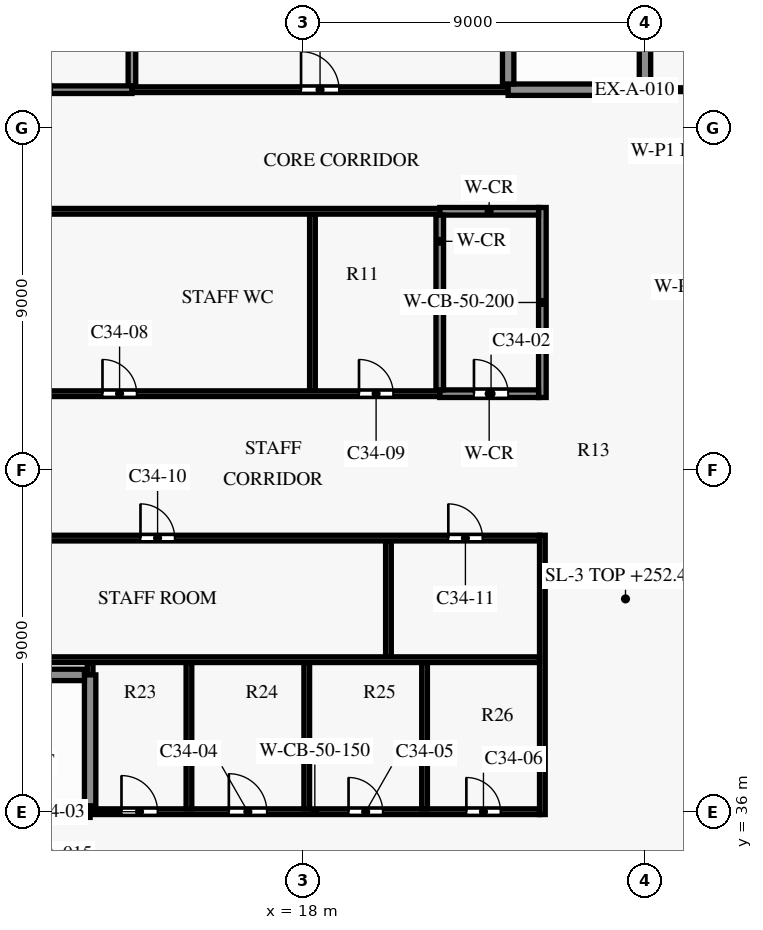
"""IFC4 building model, lengths in metres.
Left out: names, types, materials, properties, quantities, classifications, styles, units other than length and angle.
Written with IfcOpenShell. Run it as: python <this file> out.ifc"""

import sys

from ifc_helpers import new_model, si_unit, direction, frame, frame_2d, origin, place, context, subcontext, project, spatial, rectangle, extrude, element, fill, save


model = new_model("IFC4")
c1 = context("Model", 3, precision=1e-05, world=origin(), true_north=direction((0.0, 1.0)))
c2 = subcontext(c1, "Body", "Model", "MODEL_VIEW")
j1 = project(units=[si_unit("LENGTHUNIT", "METRE"), si_unit("PLANEANGLEUNIT", "RADIAN")], contexts=[c1])
p1 = place(None, origin())
s1 = spatial("IfcSite", under=j1, at=p1, CompositionType="ELEMENT")
p2 = place(p1, origin())
s2 = spatial("IfcBuilding", under=s1, at=p2, CompositionType="ELEMENT")
p3 = place(p2, frame((0.0, 0.0, 252.4)))
s3 = spatial("IfcBuildingStorey", under=s2, at=p3, CompositionType="ELEMENT", Elevation=252.4)
p4 = place(p3, frame((12.4, 36.0, 0.0), z_axis=(0.0, 0.0, 1.0), x_axis=(1.0, 0.0, 0.0)))
e1 = element("IfcWall", 1, at=p4, inside=s3, PredefinedType="SHEAR", context=c2, shape_type="SweptSolid", body=[
    extrude(rectangle(XDim=11.825, YDim=0.15, at=frame_2d((5.913, 0.0))), origin(), (0.0, 0.0, 1.0), 3.5),
])
p5 = place(p4, frame((0.825, 0.0, 0.0)))
e2 = element("IfcOpeningElement", 2, at=p5, cuts=e1, PredefinedType="OPENING", context=c2, shape_type="SweptSolid", body=[
    extrude(rectangle(XDim=0.95, YDim=2.1, at=frame_2d((0.475, 1.05))), frame((0.0, 0.085, 0.0), z_axis=(0.0, -1.0, 0.0), x_axis=(1.0, 0.0, 0.0)), (0.0, 0.0, 1.0), 0.17),
])
p6 = place(p4, frame((3.65, 0.0, 0.0)))
e3 = element("IfcOpeningElement", 3, at=p6, cuts=e1, PredefinedType="OPENING", context=c2, shape_type="SweptSolid", body=[
    extrude(rectangle(XDim=1.0, YDim=2.1, at=frame_2d((0.5, 1.05))), frame((0.0, 0.085, 0.0), z_axis=(0.0, -1.0, 0.0), x_axis=(1.0, 0.0, 0.0)), (0.0, 0.0, 1.0), 0.17),
])
p7 = place(p4, frame((6.8, 0.0, 0.0)))
e4 = element("IfcOpeningElement", 4, at=p7, cuts=e1, PredefinedType="OPENING", context=c2, shape_type="SweptSolid", body=[
    extrude(rectangle(XDim=0.9, YDim=2.1, at=frame_2d((0.45, 1.05))), frame((0.0, 0.085, 0.0), z_axis=(0.0, -1.0, 0.0), x_axis=(1.0, 0.0, 0.0)), (0.0, 0.0, 1.0), 0.17),
])
p8 = place(p4, frame((9.9, 0.0, 0.0)))
e5 = element("IfcOpeningElement", 5, at=p8, cuts=e1, PredefinedType="OPENING", context=c2, shape_type="SweptSolid", body=[
    extrude(rectangle(XDim=0.9, YDim=2.1, at=frame_2d((0.45, 1.05))), frame((0.0, 0.085, 0.0), z_axis=(0.0, -1.0, 0.0), x_axis=(1.0, 0.0, 0.0)), (0.0, 0.0, 1.0), 0.17),
])
p9 = place(p3, frame((4.4, 36.0, 0.0), z_axis=(0.0, 0.0, 1.0), x_axis=(1.0, 0.0, 0.0)))
e6 = element("IfcWall", 6, at=p9, inside=s3, PredefinedType="SHEAR", context=c2, shape_type="SweptSolid", body=[
    extrude(rectangle(XDim=8.0, YDim=0.3, at=frame_2d((4.0, 0.0))), origin(), (0.0, 0.0, 1.0), 3.5),
])
p10 = place(p9, frame((0.3, 0.0, 0.0)))
e7 = element("IfcOpeningElement", 7, at=p10, cuts=e6, PredefinedType="OPENING", context=c2, shape_type="SweptSolid", body=[
    extrude(rectangle(XDim=1.5, YDim=2.2, at=frame_2d((0.75, 1.1))), frame((0.0, 0.16, 0.0), z_axis=(0.0, -1.0, 0.0), x_axis=(1.0, 0.0, 0.0)), (0.0, 0.0, 1.0), 0.32),
])
p11 = place(p3, frame((4.55, 39.6, 0.0), z_axis=(0.0, 0.0, 1.0), x_axis=(1.0, 0.0, 0.0)))
e8 = element("IfcWall", 8, at=p11, inside=s3, PredefinedType="SHEAR", context=c2, shape_type="SweptSolid", body=[
    extrude(rectangle(XDim=7.7, YDim=0.3, at=frame_2d((3.85, 0.0))), origin(), (0.0, 0.0, 1.0), 3.5),
])
p12 = place(p3, frame((8.1, 40.0, 0.0), z_axis=(0.0, 0.0, 1.0), x_axis=(1.0, 0.0, 0.0)))
e9 = element("IfcWall", 9, at=p12, inside=s3, PredefinedType="PARTITIONING", context=c2, shape_type="SweptSolid", body=[
    extrude(rectangle(XDim=16.125, YDim=0.15, at=frame_2d((8.062, 0.0))), origin(), (0.0, 0.0, 1.0), 3.5),
])
p13 = place(p3, frame((8.1, 43.2, 0.0), z_axis=(0.0, 0.0, 1.0), x_axis=(1.0, 0.0, 0.0)))
e10 = element("IfcWall", 10, at=p13, inside=s3, PredefinedType="PARTITIONING", context=c2, shape_type="SweptSolid", body=[
    extrude(rectangle(XDim=16.125, YDim=0.15, at=frame_2d((8.062, 0.0))), origin(), (0.0, 0.0, 1.0), 3.5),
])
p14 = place(p13, frame((5.625, 0.0, 0.0)))
e11 = element("IfcOpeningElement", 11, at=p14, cuts=e10, PredefinedType="OPENING", context=c2, shape_type="SweptSolid", body=[
    extrude(rectangle(XDim=0.9, YDim=2.1, at=frame_2d((0.45, 1.05))), frame((0.0, 0.085, 0.0), z_axis=(0.0, -1.0, 0.0), x_axis=(1.0, 0.0, 0.0)), (0.0, 0.0, 1.0), 0.17),
])
p15 = place(p13, frame((13.725, 0.0, 0.0)))
e12 = element("IfcOpeningElement", 12, at=p15, cuts=e10, PredefinedType="OPENING", context=c2, shape_type="SweptSolid", body=[
    extrude(rectangle(XDim=0.9, YDim=2.1, at=frame_2d((0.45, 1.05))), frame((0.0, 0.085, 0.0), z_axis=(0.0, -1.0, 0.0), x_axis=(1.0, 0.0, 0.0)), (0.0, 0.0, 1.0), 0.17),
])
p16 = place(p3, frame((8.1, 47.0, 0.0), z_axis=(0.0, 0.0, 1.0), x_axis=(1.0, 0.0, 0.0)))
e13 = element("IfcWall", 13, at=p16, inside=s3, PredefinedType="PARTITIONING", context=c2, shape_type="SweptSolid", body=[
    extrude(rectangle(XDim=13.5, YDim=0.15, at=frame_2d((6.75, 0.0))), origin(), (0.0, 0.0, 1.0), 3.5),
])
p17 = place(p16, frame((4.625, 0.0, 0.0)))
e14 = element("IfcOpeningElement", 14, at=p17, cuts=e13, PredefinedType="OPENING", context=c2, shape_type="SweptSolid", body=[
    extrude(rectangle(XDim=0.9, YDim=2.1, at=frame_2d((0.45, 1.05))), frame((0.0, 0.085, 0.0), z_axis=(0.0, -1.0, 0.0), x_axis=(1.0, 0.0, 0.0)), (0.0, 0.0, 1.0), 0.17),
])
p18 = place(p16, frame((11.375, 0.0, 0.0)))
e15 = element("IfcOpeningElement", 15, at=p18, cuts=e13, PredefinedType="OPENING", context=c2, shape_type="SweptSolid", body=[
    extrude(rectangle(XDim=0.9, YDim=2.1, at=frame_2d((0.45, 1.05))), frame((0.0, 0.085, 0.0), z_axis=(0.0, -1.0, 0.0), x_axis=(1.0, 0.0, 0.0)), (0.0, 0.0, 1.0), 0.17),
])
p19 = place(p3, frame((21.6, 47.0, 0.0), z_axis=(0.0, 0.0, 1.0), x_axis=(1.0, 0.0, 0.0)))
e16 = element("IfcWall", 16, at=p19, inside=s3, PredefinedType="PARTITIONING", context=c2, shape_type="SweptSolid", body=[
    extrude(rectangle(XDim=2.6, YDim=0.2, at=frame_2d((1.3, 0.0))), origin(), (0.0, 0.0, 1.0), 3.5),
])
p20 = place(p19, frame((0.9, 0.0, 0.0)))
e17 = element("IfcOpeningElement", 17, at=p20, cuts=e16, PredefinedType="OPENING", context=c2, shape_type="SweptSolid", body=[
    extrude(rectangle(XDim=0.9, YDim=2.1, at=frame_2d((0.45, 1.05))), frame((0.0, 0.11, 0.0), z_axis=(0.0, -1.0, 0.0), x_axis=(1.0, 0.0, 0.0)), (0.0, 0.0, 1.0), 0.22),
])
p21 = place(p3, frame((8.225, 51.8, 0.0), z_axis=(0.0, 0.0, 1.0), x_axis=(1.0, 0.0, 0.0)))
e18 = element("IfcWall", 18, at=p21, inside=s3, PredefinedType="PARTITIONING", context=c2, shape_type="SweptSolid", body=[
    extrude(rectangle(XDim=13.375, YDim=0.15, at=frame_2d((6.688, 0.0))), origin(), (0.0, 0.0, 1.0), 3.5),
])
p22 = place(p3, frame((21.6, 51.8, 0.0), z_axis=(0.0, 0.0, 1.0), x_axis=(1.0, 0.0, 0.0)))
e19 = element("IfcWall", 19, at=p22, inside=s3, PredefinedType="PARTITIONING", context=c2, shape_type="SweptSolid", body=[
    extrude(rectangle(XDim=2.6, YDim=0.2, at=frame_2d((1.3, 0.0))), origin(), (0.0, 0.0, 1.0), 3.5),
])
p23 = place(p3, frame((8.1, 55.0, 0.0), z_axis=(0.0, 0.0, 1.0), x_axis=(1.0, 0.0, 0.0)))
e20 = element("IfcWall", 20, at=p23, inside=s3, PredefinedType="PARTITIONING", context=c2, shape_type="SweptSolid", body=[
    extrude(rectangle(XDim=5.4, YDim=0.2, at=frame_2d((2.7, 0.0))), origin(), (0.0, 0.0, 1.0), 3.5),
])
p24 = place(p23, frame((2.1, 0.0, 0.0)))
e21 = element("IfcOpeningElement", 21, at=p24, cuts=e20, PredefinedType="OPENING", context=c2, shape_type="SweptSolid", body=[
    extrude(rectangle(XDim=1.2, YDim=2.2, at=frame_2d((0.6, 1.1))), frame((0.0, 0.11, 0.0), z_axis=(0.0, -1.0, 0.0), x_axis=(1.0, 0.0, 0.0)), (0.0, 0.0, 1.0), 0.22),
])
p25 = place(p3, frame((13.5, 55.0, 0.0), z_axis=(0.0, 0.0, 1.0), x_axis=(1.0, 0.0, 0.0)))
e22 = element("IfcWall", 22, at=p25, inside=s3, PredefinedType="PARTITIONING", context=c2, shape_type="SweptSolid", body=[
    extrude(rectangle(XDim=9.9, YDim=0.15, at=frame_2d((4.95, 0.0))), origin(), (0.0, 0.0, 1.0), 3.5),
])
p26 = place(p25, frame((4.45, 0.0, 0.0)))
e23 = element("IfcOpeningElement", 23, at=p26, cuts=e22, PredefinedType="OPENING", context=c2, shape_type="SweptSolid", body=[
    extrude(rectangle(XDim=1.0, YDim=2.1, at=frame_2d((0.5, 1.05))), frame((0.0, 0.085, 0.0), z_axis=(0.0, -1.0, 0.0), x_axis=(1.0, 0.0, 0.0)), (0.0, 0.0, 1.0), 0.17),
])
p27 = place(p3, frame((23.4, 55.0, 0.0), z_axis=(0.0, 0.0, 1.0), x_axis=(1.0, 0.0, 0.0)))
e24 = element("IfcWall", 24, at=p27, inside=s3, PredefinedType="SHEAR", context=c2, shape_type="SweptSolid", body=[
    extrude(rectangle(XDim=3.45, YDim=0.3, at=frame_2d((1.725, 0.0))), origin(), (0.0, 0.0, 1.0), 3.5),
])
p28 = place(p3, frame((12.4, 39.6, 0.0), z_axis=(0.0, 0.0, 1.0), x_axis=(0.0, 1.0, 0.0)))
e25 = element("IfcWall", 25, at=p28, inside=s3, PredefinedType="PARTITIONING", context=c2, shape_type="SweptSolid", body=[
    extrude(rectangle(XDim=0.325, YDim=0.15, at=frame_2d((0.163, 0.0))), origin(), (0.0, 0.0, 1.0), 3.5),
])
p29 = place(p3, frame((12.4, 36.15, 0.0), z_axis=(0.0, 0.0, 1.0), x_axis=(0.0, 1.0, 0.0)))
e26 = element("IfcWall", 26, at=p29, inside=s3, PredefinedType="SHEAR", context=c2, shape_type="SweptSolid", body=[
    extrude(rectangle(XDim=3.45, YDim=0.3, at=frame_2d((1.725, 0.0))), origin(), (0.0, 0.0, 1.0), 3.5),
])
p30 = place(p3, frame((13.5, 55.1, 0.0), z_axis=(0.0, 0.0, 1.0), x_axis=(0.0, 1.0, 0.0)))
e27 = element("IfcWall", 27, at=p30, inside=s3, PredefinedType="PARTITIONING", context=c2, shape_type="SweptSolid", body=[
    extrude(rectangle(XDim=3.9, YDim=0.2, at=frame_2d((1.95, 0.0))), origin(), (0.0, 0.0, 1.0), 3.5),
])
for number, where, z_axis, x_axis in (
    (28, (15.0, 36.075, 0.0), (0.0, 0.0, 1.0), (0.0, 1.0, 0.0)),
    (29, (18.1, 36.075, 0.0), (0.0, 0.0, 1.0), (0.0, 1.0, 0.0)),
):
    element("IfcWall", number, at=place(p3, frame(where, z_axis=z_axis, x_axis=x_axis)), inside=s3, PredefinedType="PARTITIONING", context=c2, shape_type="SweptSolid", body=[
        extrude(rectangle(XDim=3.85, YDim=0.15, at=frame_2d((1.925, 0.0))), origin(), (0.0, 0.0, 1.0), 3.5),
    ])
p31 = place(p3, frame((18.25, 47.075, 0.0), z_axis=(0.0, 0.0, 1.0), x_axis=(0.0, 1.0, 0.0)))
e30 = element("IfcWall", 30, at=p31, inside=s3, PredefinedType="PARTITIONING", context=c2, shape_type="SweptSolid", body=[
    extrude(rectangle(XDim=4.65, YDim=0.15, at=frame_2d((2.325, 0.0))), origin(), (0.0, 0.0, 1.0), 3.5),
])
p32 = place(p3, frame((20.25, 40.075, 0.0), z_axis=(0.0, 0.0, 1.0), x_axis=(0.0, 1.0, 0.0)))
e31 = element("IfcWall", 31, at=p32, inside=s3, PredefinedType="PARTITIONING", context=c2, shape_type="SweptSolid", body=[
    extrude(rectangle(XDim=3.05, YDim=0.15, at=frame_2d((1.525, 0.0))), origin(), (0.0, 0.0, 1.0), 3.5),
])
p33 = place(p3, frame((21.2, 36.075, 0.0), z_axis=(0.0, 0.0, 1.0), x_axis=(0.0, 1.0, 0.0)))
e32 = element("IfcWall", 32, at=p33, inside=s3, PredefinedType="PARTITIONING", context=c2, shape_type="SweptSolid", body=[
    extrude(rectangle(XDim=3.85, YDim=0.15, at=frame_2d((1.925, 0.0))), origin(), (0.0, 0.0, 1.0), 3.5),
])
p34 = place(p3, frame((21.6, 47.1, 0.0), z_axis=(0.0, 0.0, 1.0), x_axis=(0.0, 1.0, 0.0)))
e33 = element("IfcWall", 33, at=p34, inside=s3, PredefinedType="PARTITIONING", context=c2, shape_type="SweptSolid", body=[
    extrude(rectangle(XDim=4.6, YDim=0.2, at=frame_2d((2.3, 0.0))), origin(), (0.0, 0.0, 1.0), 3.5),
])
p35 = place(p3, frame((23.4, 55.15, 0.0), z_axis=(0.0, 0.0, 1.0), x_axis=(0.0, 1.0, 0.0)))
e34 = element("IfcWall", 34, at=p35, inside=s3, PredefinedType="SHEAR", context=c2, shape_type="SweptSolid", body=[
    extrude(rectangle(XDim=8.0, YDim=0.3, at=frame_2d((4.0, 0.0))), origin(), (0.0, 0.0, 1.0), 3.5),
])
p36 = place(p3, frame((24.3, 35.925, 0.0), z_axis=(0.0, 0.0, 1.0), x_axis=(0.0, 1.0, 0.0)))
e35 = element("IfcWall", 35, at=p36, inside=s3, PredefinedType="PARTITIONING", context=c2, shape_type="SweptSolid", body=[
    extrude(rectangle(XDim=7.35, YDim=0.15, at=frame_2d((3.675, 0.0))), origin(), (0.0, 0.0, 1.0), 3.5),
])
p37 = place(p3, frame((24.3, 46.9, 0.0), z_axis=(0.0, 0.0, 1.0), x_axis=(0.0, 1.0, 0.0)))
e36 = element("IfcWall", 36, at=p37, inside=s3, PredefinedType="SHEAR", context=c2, shape_type="SweptSolid", body=[
    extrude(rectangle(XDim=5.0, YDim=0.2, at=frame_2d((2.5, 0.0))), origin(), (0.0, 0.0, 1.0), 3.5),
])
p38 = place(p3, frame((27.0, 54.85, 0.0), z_axis=(0.0, 0.0, 1.0), x_axis=(0.0, 1.0, 0.0)))
e37 = element("IfcWall", 37, at=p38, inside=s3, PredefinedType="SHEAR", context=c2, shape_type="SweptSolid", body=[
    extrude(rectangle(XDim=8.6, YDim=0.3, at=frame_2d((4.3, 0.0))), origin(), (0.0, 0.0, 1.0), 3.5),
])
p39 = place(p38, frame((6.55, 0.0, 0.0)))
e38 = element("IfcOpeningElement", 38, at=p39, cuts=e37, PredefinedType="OPENING", context=c2, shape_type="SweptSolid", body=[
    extrude(rectangle(XDim=1.2, YDim=2.2, at=frame_2d((0.6, 1.1))), frame((0.0, 0.16, 0.0), z_axis=(0.0, -1.0, 0.0), x_axis=(1.0, 0.0, 0.0)), (0.0, 0.0, 1.0), 0.32),
])
p40 = place(p3, frame((27.3, 55.0, 0.0), z_axis=(0.0, 0.0, 1.0), x_axis=(1.0, 0.0, 0.0)))
e39 = element("IfcWall", 39, at=p40, inside=s3, PredefinedType="PARTITIONING", context=c2, shape_type="SweptSolid", body=[
    extrude(rectangle(XDim=3.2, YDim=0.1, at=frame_2d((1.6, 0.0))), origin(), (0.0, 0.0, 1.0), 3.48),
])
p41 = place(p40, frame((1.175, 0.0, 0.0)))
e40 = element("IfcOpeningElement", 40, at=p41, cuts=e39, PredefinedType="OPENING", context=c2, shape_type="SweptSolid", body=[
    extrude(rectangle(XDim=0.9, YDim=2.1, at=frame_2d((0.45, 1.05))), frame((0.0, 0.06, 0.0), z_axis=(0.0, -1.0, 0.0), x_axis=(1.0, 0.0, 0.0)), (0.0, 0.0, 1.0), 0.12),
])
p42 = place(p24, origin())
e41 = element("IfcDoor", 41, at=p42, inside=s3, OperationType="SINGLE_SWING_RIGHT", PredefinedType="DOOR", context=c2, shape_type="SweptSolid", body=[
    extrude(rectangle(XDim=1.2, YDim=2.2, at=frame_2d((0.6, 1.1))), frame((0.0, 0.025, 0.0), z_axis=(0.0, -1.0, 0.0), x_axis=(1.0, 0.0, 0.0)), (0.0, 0.0, 1.0), 0.05),
])
fill(e21, e41)
p43 = place(p20, origin())
e42 = element("IfcDoor", 42, at=p43, inside=s3, OperationType="SINGLE_SWING_LEFT", PredefinedType="DOOR", context=c2, shape_type="SweptSolid", body=[
    extrude(rectangle(XDim=0.9, YDim=2.1, at=frame_2d((0.45, 1.05))), frame((0.0, 0.025, 0.0), z_axis=(0.0, -1.0, 0.0), x_axis=(1.0, 0.0, 0.0)), (0.0, 0.0, 1.0), 0.05),
])
fill(e17, e42)
p44 = place(p5, origin())
e43 = element("IfcDoor", 43, at=p44, inside=s3, OperationType="SINGLE_SWING_RIGHT", PredefinedType="DOOR", context=c2, shape_type="SweptSolid", body=[
    extrude(rectangle(XDim=0.95, YDim=2.1, at=frame_2d((0.475, 1.05))), frame((0.0, 0.025, 0.0), z_axis=(0.0, -1.0, 0.0), x_axis=(1.0, 0.0, 0.0)), (0.0, 0.0, 1.0), 0.05),
])
fill(e2, e43)
p45 = place(p6, origin())
e44 = element("IfcDoor", 44, at=p45, inside=s3, OperationType="SINGLE_SWING_LEFT", PredefinedType="DOOR", context=c2, shape_type="SweptSolid", body=[
    extrude(rectangle(XDim=1.0, YDim=2.1, at=frame_2d((0.5, 1.05))), frame((0.0, 0.025, 0.0), z_axis=(0.0, -1.0, 0.0), x_axis=(1.0, 0.0, 0.0)), (0.0, 0.0, 1.0), 0.05),
])
fill(e3, e44)
p46 = place(p7, origin())
e45 = element("IfcDoor", 45, at=p46, inside=s3, OperationType="SINGLE_SWING_RIGHT", PredefinedType="DOOR", context=c2, shape_type="SweptSolid", body=[
    extrude(rectangle(XDim=0.9, YDim=2.1, at=frame_2d((0.45, 1.05))), frame((0.0, 0.025, 0.0), z_axis=(0.0, -1.0, 0.0), x_axis=(1.0, 0.0, 0.0)), (0.0, 0.0, 1.0), 0.05),
])
fill(e4, e45)
p47 = place(p8, origin())
e46 = element("IfcDoor", 46, at=p47, inside=s3, OperationType="SINGLE_SWING_LEFT", PredefinedType="DOOR", context=c2, shape_type="SweptSolid", body=[
    extrude(rectangle(XDim=0.9, YDim=2.1, at=frame_2d((0.45, 1.05))), frame((0.0, 0.025, 0.0), z_axis=(0.0, -1.0, 0.0), x_axis=(1.0, 0.0, 0.0)), (0.0, 0.0, 1.0), 0.05),
])
fill(e5, e46)
p48 = place(p17, origin())
e47 = element("IfcDoor", 47, at=p48, inside=s3, OperationType="SINGLE_SWING_LEFT", PredefinedType="DOOR", context=c2, shape_type="SweptSolid", body=[
    extrude(rectangle(XDim=0.9, YDim=2.1, at=frame_2d((0.45, 1.05))), frame((0.0, 0.025, 0.0), z_axis=(0.0, -1.0, 0.0), x_axis=(1.0, 0.0, 0.0)), (0.0, 0.0, 1.0), 0.05),
])
fill(e14, e47)
p49 = place(p18, origin())
e48 = element("IfcDoor", 48, at=p49, inside=s3, OperationType="SINGLE_SWING_RIGHT", PredefinedType="DOOR", context=c2, shape_type="SweptSolid", body=[
    extrude(rectangle(XDim=0.9, YDim=2.1, at=frame_2d((0.45, 1.05))), frame((0.0, 0.025, 0.0), z_axis=(0.0, -1.0, 0.0), x_axis=(1.0, 0.0, 0.0)), (0.0, 0.0, 1.0), 0.05),
])
fill(e15, e48)
p50 = place(p14, origin())
e49 = element("IfcDoor", 49, at=p50, inside=s3, OperationType="SINGLE_SWING_RIGHT", PredefinedType="DOOR", context=c2, shape_type="SweptSolid", body=[
    extrude(rectangle(XDim=0.9, YDim=2.1, at=frame_2d((0.45, 1.05))), frame((0.0, 0.025, 0.0), z_axis=(0.0, -1.0, 0.0), x_axis=(1.0, 0.0, 0.0)), (0.0, 0.0, 1.0), 0.05),
])
fill(e11, e49)
p51 = place(p15, origin())
e50 = element("IfcDoor", 50, at=p51, inside=s3, OperationType="SINGLE_SWING_LEFT", PredefinedType="DOOR", context=c2, shape_type="SweptSolid", body=[
    extrude(rectangle(XDim=0.9, YDim=2.1, at=frame_2d((0.45, 1.05))), frame((0.0, 0.025, 0.0), z_axis=(0.0, -1.0, 0.0), x_axis=(1.0, 0.0, 0.0)), (0.0, 0.0, 1.0), 0.05),
])
fill(e12, e50)
p52 = place(p26, origin())
e51 = element("IfcDoor", 51, at=p52, inside=s3, OperationType="SINGLE_SWING_LEFT", PredefinedType="DOOR", context=c2, shape_type="SweptSolid", body=[
    extrude(rectangle(XDim=1.0, YDim=2.1, at=frame_2d((0.5, 1.05))), frame((0.0, 0.025, 0.0), z_axis=(0.0, -1.0, 0.0), x_axis=(1.0, 0.0, 0.0)), (0.0, 0.0, 1.0), 0.05),
])
fill(e23, e51)
save(model, sys.argv[1])
